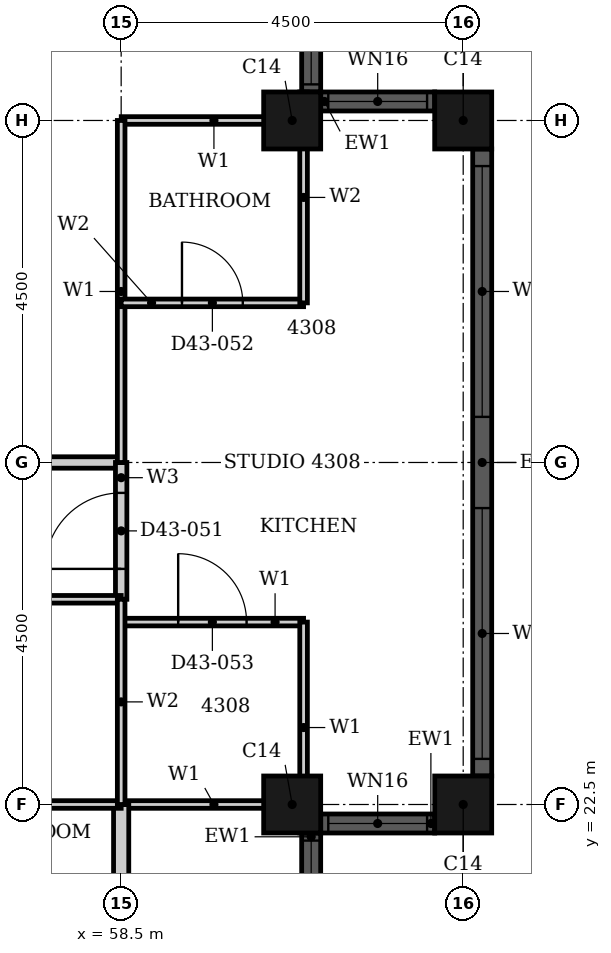
"""IFC4 building model, lengths in metres.
Left out: names, types, materials, properties, quantities, classifications, styles, units other than length and angle.
Written with IfcOpenShell. Run it as: python <this file> out.ifc"""

import sys

from ifc_helpers import new_model, si_unit, direction, frame, frame_2d, origin, origin_2d, place, context, subcontext, project, spatial, rectangle, hollow_rectangle, extrude, element, fill, save


model = new_model("IFC4")
c1 = context("Model", 3, precision=1e-05, world=origin(), true_north=direction((0.0, 1.0)))
c2 = subcontext(c1, "Body", "Model", "MODEL_VIEW")
j1 = project(units=[si_unit("LENGTHUNIT", "METRE"), si_unit("PLANEANGLEUNIT", "RADIAN")], contexts=[c1])
p1 = place(None, origin())
s1 = spatial("IfcSite", under=j1, at=p1, CompositionType="ELEMENT")
p2 = place(p1, origin())
s2 = spatial("IfcBuilding", under=s1, at=p2, CompositionType="ELEMENT")
p3 = place(p2, frame((0.0, 0.0, 172.8)))
s3 = spatial("IfcBuildingStorey", under=s2, at=p3, CompositionType="ELEMENT", Elevation=172.8)
for number, where, z_axis, x_axis in (
    (1, (60.75, 22.5, 0.0), (0.0, 0.0, 1.0), (1.0, 0.0, 0.0)),
    (2, (63.0, 22.5, 0.0), (0.0, 0.0, 1.0), (1.0, 0.0, 0.0)),
    (3, (63.0, 31.5, 0.0), (0.0, 0.0, 1.0), (1.0, 0.0, 0.0)),
    (4, (60.75, 31.5, 0.0), (0.0, 0.0, 1.0), (1.0, 0.0, 0.0)),
):
    element("IfcColumn", number, at=place(p3, frame(where, z_axis=z_axis, x_axis=x_axis)), inside=s3, PredefinedType="COLUMN", context=c2, shape_type="SweptSolid", body=[
        extrude(hollow_rectangle(XDim=0.75, YDim=0.75, WallThickness=0.024, at=origin_2d()), origin(), (0.0, 0.0, 1.0), 3.7),
    ])
p4 = place(p3, frame((61.0, 20.625, 0.0), z_axis=(0.0, 0.0, 1.0), x_axis=(0.0, 1.0, 0.0)))
e5 = element("IfcWall", 5, at=p4, inside=s3, PredefinedType="SOLIDWALL", context=c2, shape_type="SweptSolid", body=[
    extrude(rectangle(XDim=1.5, YDim=0.25, at=frame_2d((0.75, 0.0))), origin(), (0.0, 0.0, 1.0), 3.7),
])
p5 = place(p4, frame((0.1, 0.0, 0.9)))
e6 = element("IfcOpeningElement", 6, at=p5, cuts=e5, PredefinedType="OPENING", context=c2, shape_type="SweptSolid", body=[
    extrude(rectangle(XDim=1.3, YDim=1.85, at=frame_2d((0.65, 0.925))), frame((0.0, 0.135, 0.0), z_axis=(0.0, -1.0, 0.0), x_axis=(1.0, 0.0, 0.0)), (0.0, 0.0, 1.0), 0.27),
])
p6 = place(p3, frame((61.125, 22.25, 0.0), z_axis=(0.0, 0.0, 1.0), x_axis=(1.0, 0.0, 0.0)))
e7 = element("IfcWall", 7, at=p6, inside=s3, PredefinedType="SOLIDWALL", context=c2, shape_type="SweptSolid", body=[
    extrude(rectangle(XDim=1.5, YDim=0.25, at=frame_2d((0.75, 0.0))), origin(), (0.0, 0.0, 1.0), 3.7),
])
p7 = place(p6, frame((0.1, 0.0, 0.9)))
e8 = element("IfcOpeningElement", 8, at=p7, cuts=e7, PredefinedType="OPENING", context=c2, shape_type="SweptSolid", body=[
    extrude(rectangle(XDim=1.3, YDim=1.85, at=frame_2d((0.65, 0.925))), frame((0.0, 0.135, 0.0), z_axis=(0.0, -1.0, 0.0), x_axis=(1.0, 0.0, 0.0)), (0.0, 0.0, 1.0), 0.27),
])
p8 = place(p3, frame((63.25, 22.875, 0.0), z_axis=(0.0, 0.0, 1.0), x_axis=(0.0, 1.0, 0.0)))
e9 = element("IfcWall", 9, at=p8, inside=s3, PredefinedType="SOLIDWALL", context=c2, shape_type="SweptSolid", body=[
    extrude(rectangle(XDim=8.25, YDim=0.25, at=frame_2d((4.125, 0.0))), origin(), (0.0, 0.0, 1.0), 3.7),
])
p9 = place(p8, frame((0.225, 0.0, 0.45)))
e10 = element("IfcOpeningElement", 10, at=p9, cuts=e9, PredefinedType="OPENING", context=c2, shape_type="SweptSolid", body=[
    extrude(rectangle(XDim=3.3, YDim=2.3, at=frame_2d((1.65, 1.15))), frame((0.0, 0.135, 0.0), z_axis=(0.0, -1.0, 0.0), x_axis=(1.0, 0.0, 0.0)), (0.0, 0.0, 1.0), 0.27),
])
p10 = place(p8, frame((4.725, 0.0, 0.45)))
e11 = element("IfcOpeningElement", 11, at=p10, cuts=e9, PredefinedType="OPENING", context=c2, shape_type="SweptSolid", body=[
    extrude(rectangle(XDim=3.3, YDim=2.3, at=frame_2d((1.65, 1.15))), frame((0.0, 0.135, 0.0), z_axis=(0.0, -1.0, 0.0), x_axis=(1.0, 0.0, 0.0)), (0.0, 0.0, 1.0), 0.27),
])
p11 = place(p3, frame((62.625, 31.75, 0.0), z_axis=(0.0, 0.0, 1.0), x_axis=(-1.0, 0.0, 0.0)))
e12 = element("IfcWall", 12, at=p11, inside=s3, PredefinedType="SOLIDWALL", context=c2, shape_type="SweptSolid", body=[
    extrude(rectangle(XDim=1.5, YDim=0.25, at=frame_2d((0.75, 0.0))), origin(), (0.0, 0.0, 1.0), 3.7),
])
p12 = place(p11, frame((0.1, 0.0, 0.9)))
e13 = element("IfcOpeningElement", 13, at=p12, cuts=e12, PredefinedType="OPENING", context=c2, shape_type="SweptSolid", body=[
    extrude(rectangle(XDim=1.3, YDim=1.85, at=frame_2d((0.65, 0.925))), frame((0.0, 0.135, 0.0), z_axis=(0.0, -1.0, 0.0), x_axis=(1.0, 0.0, 0.0)), (0.0, 0.0, 1.0), 0.27),
])
p13 = place(p3, frame((61.0, 31.875, 0.0), z_axis=(0.0, 0.0, 1.0), x_axis=(0.0, 1.0, 0.0)))
e14 = element("IfcWall", 14, at=p13, inside=s3, PredefinedType="SOLIDWALL", context=c2, shape_type="SweptSolid", body=[
    extrude(rectangle(XDim=1.5, YDim=0.25, at=frame_2d((0.75, 0.0))), origin(), (0.0, 0.0, 1.0), 3.7),
])
p14 = place(p13, frame((0.1, 0.0, 0.9)))
e15 = element("IfcOpeningElement", 15, at=p14, cuts=e14, PredefinedType="OPENING", context=c2, shape_type="SweptSolid", body=[
    extrude(rectangle(XDim=1.3, YDim=1.85, at=frame_2d((0.65, 0.925))), frame((0.0, 0.135, 0.0), z_axis=(0.0, -1.0, 0.0), x_axis=(1.0, 0.0, 0.0)), (0.0, 0.0, 1.0), 0.27),
])
p15 = place(p3, frame((45.0, 27.0, 0.0), z_axis=(0.0, 0.0, 1.0), x_axis=(1.0, 0.0, 0.0)))
e16 = element("IfcWall", 16, at=p15, inside=s3, PredefinedType="PARTITIONING", context=c2, shape_type="SweptSolid", body=[
    extrude(rectangle(XDim=13.5, YDim=0.15, at=frame_2d((6.75, 0.0))), origin(), (0.0, 0.0, 1.0), 2.68),
])
p16 = place(p15, frame((7.15, 0.0, 0.0)))
e17 = element("IfcOpeningElement", 17, at=p16, cuts=e16, PredefinedType="OPENING", context=c2, shape_type="SweptSolid", body=[
    extrude(rectangle(XDim=1.0, YDim=2.1, at=frame_2d((0.5, 1.05))), frame((0.0, 0.085, 0.0), z_axis=(0.0, -1.0, 0.0), x_axis=(1.0, 0.0, 0.0)), (0.0, 0.0, 1.0), 0.17),
])
p17 = place(p3, frame((58.5, 25.2, 0.0), z_axis=(0.0, 0.0, 1.0), x_axis=(0.0, 1.0, 0.0)))
e18 = element("IfcWall", 18, at=p17, inside=s3, PredefinedType="PARTITIONING", context=c2, shape_type="SweptSolid", body=[
    extrude(rectangle(XDim=1.8, YDim=0.15, at=frame_2d((0.9, 0.0))), origin(), (0.0, 0.0, 1.0), 3.4),
])
p18 = place(p17, frame((0.4, 0.0, 0.0)))
e19 = element("IfcOpeningElement", 19, at=p18, cuts=e18, PredefinedType="OPENING", context=c2, shape_type="SweptSolid", body=[
    extrude(rectangle(XDim=1.0, YDim=2.2, at=frame_2d((0.5, 1.1))), frame((0.0, 0.085, 0.0), z_axis=(0.0, -1.0, 0.0), x_axis=(1.0, 0.0, 0.0)), (0.0, 0.0, 1.0), 0.17),
])
p19 = place(p3, frame((58.501, 22.5, 0.0), z_axis=(0.0, 0.0, 1.0), x_axis=(1.0, 0.0, 0.0)))
e20 = element("IfcWall", 20, at=p19, inside=s3, PredefinedType="PARTITIONING", context=c2, shape_type="SweptSolid", body=[
    extrude(rectangle(XDim=2.439, YDim=0.1, at=frame_2d((1.219, 0.0))), origin(), (0.0, 0.0, 1.0), 2.68),
])
p20 = place(p3, frame((58.5, 24.9, 0.0), z_axis=(0.0, 0.0, 1.0), x_axis=(1.0, 0.0, 0.0)))
e21 = element("IfcWall", 21, at=p20, inside=s3, PredefinedType="PARTITIONING", context=c2, shape_type="SweptSolid", body=[
    extrude(rectangle(XDim=2.4, YDim=0.1, at=frame_2d((1.2, 0.0))), origin(), (0.0, 0.0, 1.0), 3.4),
])
p21 = place(p20, frame((0.75, 0.0, 0.0)))
e22 = element("IfcOpeningElement", 22, at=p21, cuts=e21, PredefinedType="OPENING", context=c2, shape_type="SweptSolid", body=[
    extrude(rectangle(XDim=0.9, YDim=2.1, at=frame_2d((0.45, 1.05))), frame((0.0, 0.06, 0.0), z_axis=(0.0, -1.0, 0.0), x_axis=(1.0, 0.0, 0.0)), (0.0, 0.0, 1.0), 0.12),
])
p22 = place(p3, frame((58.501, 31.5, 0.0), z_axis=(0.0, 0.0, 1.0), x_axis=(1.0, 0.0, 0.0)))
e23 = element("IfcWall", 23, at=p22, inside=s3, PredefinedType="PARTITIONING", context=c2, shape_type="SweptSolid", body=[
    extrude(rectangle(XDim=2.439, YDim=0.1, at=frame_2d((1.219, 0.0))), origin(), (0.0, 0.0, 1.0), 2.68),
])
p23 = place(p3, frame((58.5, 27.0, 0.0), z_axis=(0.0, 0.0, 1.0), x_axis=(0.0, 1.0, 0.0)))
e24 = element("IfcWall", 24, at=p23, inside=s3, PredefinedType="PARTITIONING", context=c2, shape_type="SweptSolid", body=[
    extrude(rectangle(XDim=4.5, YDim=0.1, at=frame_2d((2.25, 0.0))), origin(), (0.0, 0.0, 1.0), 3.4),
])
p24 = place(p3, frame((60.9, 22.125, 0.0), z_axis=(0.0, 0.0, 1.0), x_axis=(0.0, 1.0, 0.0)))
e25 = element("IfcWall", 25, at=p24, inside=s3, PredefinedType="PARTITIONING", context=c2, shape_type="SweptSolid", body=[
    extrude(rectangle(XDim=2.775, YDim=0.1, at=frame_2d((1.387, 0.0))), origin(), (0.0, 0.0, 1.0), 3.4),
])
p25 = place(p3, frame((58.5, 20.06, 0.0), z_axis=(0.0, 0.0, 1.0), x_axis=(0.0, 1.0, 0.0)))
e26 = element("IfcWall", 26, at=p25, inside=s3, PredefinedType="PARTITIONING", context=c2, shape_type="SweptSolid", body=[
    extrude(rectangle(XDim=2.439, YDim=0.2, at=frame_2d((1.219, 0.0))), origin(), (0.0, 0.0, 1.0), 3.4),
])
p26 = place(p3, frame((56.1, 22.5, 0.0), z_axis=(0.0, 0.0, 1.0), x_axis=(1.0, 0.0, 0.0)))
e27 = element("IfcWall", 27, at=p26, inside=s3, PredefinedType="PARTITIONING", context=c2, shape_type="SweptSolid", body=[
    extrude(rectangle(XDim=2.4, YDim=0.1, at=frame_2d((1.2, 0.0))), origin(), (0.0, 0.0, 1.0), 2.68),
])
p27 = place(p3, frame((56.1, 25.2, 0.0), z_axis=(0.0, 0.0, 1.0), x_axis=(1.0, 0.0, 0.0)))
e28 = element("IfcWall", 28, at=p27, inside=s3, PredefinedType="PARTITIONING", context=c2, shape_type="SweptSolid", body=[
    extrude(rectangle(XDim=2.4, YDim=0.1, at=frame_2d((1.2, 0.0))), origin(), (0.0, 0.0, 1.0), 3.4),
])
p28 = place(p3, frame((58.5, 29.1, 0.0), z_axis=(0.0, 0.0, 1.0), x_axis=(1.0, 0.0, 0.0)))
e29 = element("IfcWall", 29, at=p28, inside=s3, PredefinedType="PARTITIONING", context=c2, shape_type="SweptSolid", body=[
    extrude(rectangle(XDim=2.4, YDim=0.1, at=frame_2d((1.2, 0.0))), origin(), (0.0, 0.0, 1.0), 3.4),
])
p29 = place(p28, frame((0.8, 0.0, 0.0)))
e30 = element("IfcOpeningElement", 30, at=p29, cuts=e29, PredefinedType="OPENING", context=c2, shape_type="SweptSolid", body=[
    extrude(rectangle(XDim=0.8, YDim=2.1, at=frame_2d((0.4, 1.05))), frame((0.0, 0.06, 0.0), z_axis=(0.0, -1.0, 0.0), x_axis=(1.0, 0.0, 0.0)), (0.0, 0.0, 1.0), 0.12),
])
p30 = place(p3, frame((58.5, 22.5, 0.0), z_axis=(0.0, 0.0, 1.0), x_axis=(0.0, 1.0, 0.0)))
e31 = element("IfcWall", 31, at=p30, inside=s3, PredefinedType="PARTITIONING", context=c2, shape_type="SweptSolid", body=[
    extrude(rectangle(XDim=2.7, YDim=0.1, at=frame_2d((1.35, 0.0))), origin(), (0.0, 0.0, 1.0), 3.4),
])
p31 = place(p3, frame((60.9, 29.1, 0.0), z_axis=(0.0, 0.0, 1.0), x_axis=(0.0, 1.0, 0.0)))
e32 = element("IfcWall", 32, at=p31, inside=s3, PredefinedType="PARTITIONING", context=c2, shape_type="SweptSolid", body=[
    extrude(rectangle(XDim=2.775, YDim=0.1, at=frame_2d((1.387, 0.0))), origin(), (0.0, 0.0, 1.0), 3.4),
])
p32 = place(p5, origin())
e33 = element("IfcWindow", 33, at=p32, inside=s3, PartitioningType="SINGLE_PANEL", PredefinedType="WINDOW", context=c2, shape_type="SweptSolid", body=[
    extrude(rectangle(XDim=1.3, YDim=1.85, at=frame_2d((0.65, 0.925))), frame((0.0, 0.03, 0.0), z_axis=(0.0, -1.0, 0.0), x_axis=(1.0, 0.0, 0.0)), (0.0, 0.0, 1.0), 0.06),
])
fill(e6, e33)
p33 = place(p7, origin())
e34 = element("IfcWindow", 34, at=p33, inside=s3, PartitioningType="SINGLE_PANEL", PredefinedType="WINDOW", context=c2, shape_type="SweptSolid", body=[
    extrude(rectangle(XDim=1.3, YDim=1.85, at=frame_2d((0.65, 0.925))), frame((0.0, 0.03, 0.0), z_axis=(0.0, -1.0, 0.0), x_axis=(1.0, 0.0, 0.0)), (0.0, 0.0, 1.0), 0.06),
])
fill(e8, e34)
p34 = place(p9, origin())
e35 = element("IfcWindow", 35, at=p34, inside=s3, PartitioningType="SINGLE_PANEL", PredefinedType="WINDOW", context=c2, shape_type="SweptSolid", body=[
    extrude(rectangle(XDim=3.3, YDim=2.3, at=frame_2d((1.65, 1.15))), frame((0.0, 0.03, 0.0), z_axis=(0.0, -1.0, 0.0), x_axis=(1.0, 0.0, 0.0)), (0.0, 0.0, 1.0), 0.06),
])
fill(e10, e35)
p35 = place(p10, origin())
e36 = element("IfcWindow", 36, at=p35, inside=s3, PartitioningType="SINGLE_PANEL", PredefinedType="WINDOW", context=c2, shape_type="SweptSolid", body=[
    extrude(rectangle(XDim=3.3, YDim=2.3, at=frame_2d((1.65, 1.15))), frame((0.0, 0.03, 0.0), z_axis=(0.0, -1.0, 0.0), x_axis=(1.0, 0.0, 0.0)), (0.0, 0.0, 1.0), 0.06),
])
fill(e11, e36)
p36 = place(p12, origin())
e37 = element("IfcWindow", 37, at=p36, inside=s3, PartitioningType="SINGLE_PANEL", PredefinedType="WINDOW", context=c2, shape_type="SweptSolid", body=[
    extrude(rectangle(XDim=1.3, YDim=1.85, at=frame_2d((0.65, 0.925))), frame((0.0, 0.03, 0.0), z_axis=(0.0, -1.0, 0.0), x_axis=(1.0, 0.0, 0.0)), (0.0, 0.0, 1.0), 0.06),
])
fill(e13, e37)
p37 = place(p14, origin())
e38 = element("IfcWindow", 38, at=p37, inside=s3, PartitioningType="SINGLE_PANEL", PredefinedType="WINDOW", context=c2, shape_type="SweptSolid", body=[
    extrude(rectangle(XDim=1.3, YDim=1.85, at=frame_2d((0.65, 0.925))), frame((0.0, 0.03, 0.0), z_axis=(0.0, -1.0, 0.0), x_axis=(1.0, 0.0, 0.0)), (0.0, 0.0, 1.0), 0.06),
])
fill(e15, e38)
p38 = place(p18, origin())
e39 = element("IfcDoor", 39, at=p38, inside=s3, OperationType="SINGLE_SWING_LEFT", PredefinedType="DOOR", context=c2, shape_type="SweptSolid", body=[
    extrude(rectangle(XDim=1.0, YDim=2.2, at=frame_2d((0.5, 1.1))), frame((0.0, 0.025, 0.0), z_axis=(0.0, -1.0, 0.0), x_axis=(1.0, 0.0, 0.0)), (0.0, 0.0, 1.0), 0.05),
])
fill(e19, e39)
p39 = place(p29, origin())
e40 = element("IfcDoor", 40, at=p39, inside=s3, OperationType="SINGLE_SWING_LEFT", PredefinedType="DOOR", context=c2, shape_type="SweptSolid", body=[
    extrude(rectangle(XDim=0.8, YDim=2.1, at=frame_2d((0.4, 1.05))), frame((0.0, 0.025, 0.0), z_axis=(0.0, -1.0, 0.0), x_axis=(1.0, 0.0, 0.0)), (0.0, 0.0, 1.0), 0.05),
])
fill(e30, e40)
p40 = place(p21, origin())
e41 = element("IfcDoor", 41, at=p40, inside=s3, OperationType="SINGLE_SWING_RIGHT", PredefinedType="DOOR", context=c2, shape_type="SweptSolid", body=[
    extrude(rectangle(XDim=0.9, YDim=2.1, at=frame_2d((0.45, 1.05))), frame((0.0, 0.025, 0.0), z_axis=(0.0, -1.0, 0.0), x_axis=(1.0, 0.0, 0.0)), (0.0, 0.0, 1.0), 0.05),
])
fill(e22, e41)
save(model, sys.argv[1])
